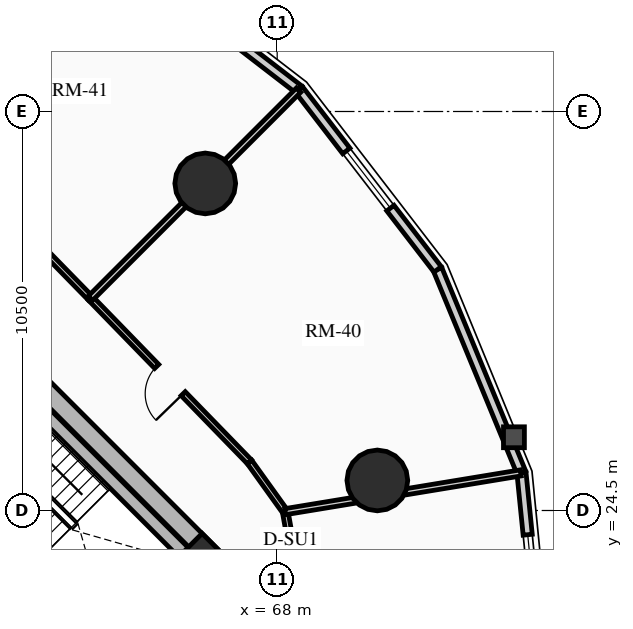
"""IFC4 building model, lengths in metres.
Left out: names, types, materials, properties, quantities, classifications, styles, units other than length and angle.
Written with IfcOpenShell. Run it as: python <this file> out.ifc"""

import sys

from ifc_helpers import new_model, si_unit, direction, frame, frame_2d, origin, origin_2d, place, context, subcontext, project, spatial, rectangle, circle, extrude, source, transform, mapped, element, fill, save


model = new_model("IFC4")
c1 = context("Model", 3, precision=1e-05, world=origin(), true_north=direction((0.0, 1.0)))
c2 = subcontext(c1, "Body", "Model", "MODEL_VIEW")
j1 = project(units=[si_unit("LENGTHUNIT", "METRE"), si_unit("PLANEANGLEUNIT", "RADIAN")], contexts=[c1])
p1 = place(None, origin())
s1 = spatial("IfcSite", under=j1, at=p1, CompositionType="ELEMENT")
p2 = place(p1, origin())
s2 = spatial("IfcBuilding", under=s1, at=p2, CompositionType="ELEMENT")
p3 = place(p2, frame((0.0, 0.0, 62.74)))
s3 = spatial("IfcBuildingStorey", under=s2, at=p3, CompositionType="ELEMENT", Elevation=62.74)
p4 = place(p3, frame((66.339, 23.227, 0.0), z_axis=(0.0, 0.0, 1.0), x_axis=(-0.707106781187, 0.707106781187, 0.0)))
e1 = element("IfcWall", 1, at=p4, inside=s3, PredefinedType="SHEAR", context=c2, shape_type="SweptSolid", body=[
    extrude(rectangle(XDim=14.3, YDim=0.5, at=frame_2d((7.15, 0.0))), origin(), (0.0, 0.0, 1.0), 2.91),
])
p5 = place(p3, frame((58.596, 15.838, 0.0), z_axis=(0.0, 0.0, 1.0), x_axis=(0.707106781187, 0.707106781187, 0.0)))
e2 = element("IfcWall", 2, at=p5, inside=s3, PredefinedType="SHEAR", context=c2, shape_type="SweptSolid", body=[
    extrude(rectangle(XDim=10.7, YDim=0.5, at=frame_2d((5.35, 0.0))), origin(), (0.0, 0.0, 1.0), 2.91),
])
m1 = source(origin(), c2, "Body", "SweptSolid", [
    extrude(rectangle(XDim=1.5, YDim=2.02, at=frame_2d((0.75, 1.01))), frame((0.0, 0.26, 0.0), z_axis=(0.0, -1.0, 0.0), x_axis=(1.0, 0.0, 0.0)), (0.0, 0.0, 1.0), 0.52),
])
p6 = place(p5, frame((5.45, 0.0, 0.0)))
e3 = element("IfcOpeningElement", 3, at=p6, cuts=e2, PredefinedType="OPENING", context=c2, shape_type="MappedRepresentation", body=[
    mapped(m1, transform((0.0, 0.0, 0.0), x_axis=(1.0, 0.0, 0.0), y_axis=(0.0, 1.0, 0.0), z_axis=(0.0, 0.0, 1.0), scale=1.0)),
])
p7 = place(p3, frame((63.662, 20.904, 0.0), z_axis=(0.0, 0.0, 1.0), x_axis=(-0.707106781187, 0.707106781187, 0.0)))
e4 = element("IfcWall", 4, at=p7, inside=s3, PredefinedType="SHEAR", context=c2, shape_type="SweptSolid", body=[
    extrude(rectangle(XDim=13.8, YDim=0.35, at=frame_2d((6.9, 0.0))), origin(), (0.0, 0.0, 1.0), 2.91),
])
m2 = source(origin(), c2, "Body", "SweptSolid", [
    extrude(rectangle(XDim=1.1, YDim=2.015, at=frame_2d((0.55, 1.007))), frame((0.0, 0.185, 0.0), z_axis=(0.0, -1.0, 0.0), x_axis=(1.0, 0.0, 0.0)), (0.0, 0.0, 1.0), 0.37),
])
p8 = place(p7, frame((10.025, 0.0, 0.0)))
e5 = element("IfcOpeningElement", 5, at=p8, cuts=e4, PredefinedType="OPENING", context=c2, shape_type="MappedRepresentation", body=[
    mapped(m2, transform((0.0, 0.0, 0.0), x_axis=(1.0, 0.0, 0.0), y_axis=(0.0, 1.0, 0.0), z_axis=(0.0, 0.0, 1.0), scale=1.0)),
])
p9 = place(p7, frame((12.025, 0.0, 0.0)))
e6 = element("IfcOpeningElement", 6, at=p9, cuts=e4, PredefinedType="OPENING", context=c2, shape_type="MappedRepresentation", body=[
    mapped(m2, transform((0.0, 0.0, 0.0), x_axis=(1.0, 0.0, 0.0), y_axis=(0.0, 1.0, 0.0), z_axis=(0.0, 0.0, 1.0), scale=1.0)),
])
m3 = source(origin(), c2, "Body", "SweptSolid", [
    extrude(rectangle(XDim=1.15, YDim=2.02, at=frame_2d((0.575, 1.01))), frame((0.0, 0.185, 0.0), z_axis=(0.0, -1.0, 0.0), x_axis=(1.0, 0.0, 0.0)), (0.0, 0.0, 1.0), 0.37),
])
p10 = place(p7, frame((5.33, 0.0, 0.0)))
e7 = element("IfcOpeningElement", 7, at=p10, cuts=e4, PredefinedType="OPENING", context=c2, shape_type="MappedRepresentation", body=[
    mapped(m3, transform((0.0, 0.0, 0.0), x_axis=(1.0, 0.0, 0.0), y_axis=(0.0, 1.0, 0.0), z_axis=(0.0, 0.0, 1.0), scale=1.0)),
])
p11 = place(p3, frame((65.847, 23.089, 0.0), z_axis=(0.0, 0.0, 1.0), x_axis=(-0.707106781187, 0.707106781187, 0.0)))
e8 = element("IfcWall", 8, at=p11, inside=s3, PredefinedType="SHEAR", context=c2, shape_type="SweptSolid", body=[
    extrude(rectangle(XDim=6.745, YDim=0.35, at=frame_2d((3.373, 0.0))), origin(), (0.0, 0.0, 1.0), 2.91),
])
p12 = place(p3, frame((66.024, 23.294, 0.0), z_axis=(0.0, 0.0, 1.0), x_axis=(0.707106781187, 0.707106781187, 0.0)))
e9 = element("IfcColumn", 9, at=p12, inside=s3, PredefinedType="COLUMN", context=c2, shape_type="SweptSolid", body=[
    extrude(rectangle(XDim=0.85, YDim=0.85, at=origin_2d()), origin(), (0.0, 0.0, 1.0), 2.91),
])
for number, where, z_axis, x_axis in (
    (10, (66.107, 33.107, 0.0), (0.0, 0.0, 1.0), (1.0, 0.0, 0.0)),
    (11, (70.635, 25.291, 0.0), (0.0, 0.0, 1.0), (1.0, 0.0, 0.0)),
):
    element("IfcColumn", number, at=place(p3, frame(where, z_axis=z_axis, x_axis=x_axis)), inside=s3, PredefinedType="USERDEFINED", context=c2, shape_type="SweptSolid", body=[
        extrude(circle(Radius=0.8, at=origin_2d()), origin(), (0.0, 0.0, 1.0), 2.91),
    ])
p13 = place(p3, frame((63.844, 39.222, 0.0), z_axis=(0.0, 0.0, 1.0), x_axis=(0.792014314407, -0.610502519057, 0.0)))
e12 = element("IfcWall", 12, at=p13, inside=s3, PredefinedType="SOLIDWALL", context=c2, shape_type="SweptSolid", body=[
    extrude(rectangle(XDim=5.973, YDim=0.24, at=frame_2d((2.987, 0.0))), origin(), (0.0, 0.0, 1.0), 2.079),
])
p14 = place(p3, frame((74.428, 25.493, 0.0), z_axis=(0.0, 0.0, 1.0), x_axis=(0.100165739718, -0.994970765694, 0.0)))
e13 = element("IfcWall", 13, at=p14, inside=s3, PredefinedType="SOLIDWALL", context=c2, shape_type="SweptSolid", body=[
    extrude(rectangle(XDim=5.477, YDim=0.24, at=frame_2d((2.738, 0.0))), origin(), (0.0, 0.0, 1.0), 2.079),
])
m4 = source(origin(), c2, "Body", "SweptSolid", [
    extrude(rectangle(XDim=2.2, YDim=1.35, at=frame_2d((1.1, 0.675))), frame((0.0, 0.13, 0.0), z_axis=(0.0, -1.0, 0.0), x_axis=(1.0, 0.0, 0.0)), (0.0, 0.0, 1.0), 0.26),
])
p15 = place(p14, frame((1.638, 0.0, 0.65)))
e14 = element("IfcOpeningElement", 14, at=p15, cuts=e13, PredefinedType="OPENING", context=c2, shape_type="MappedRepresentation", body=[
    mapped(m4, transform((0.0, 0.0, 0.0), x_axis=(1.0, 0.0, 0.0), y_axis=(0.0, 1.0, 0.0), z_axis=(0.0, 0.0, 1.0), scale=1.0)),
])
p16 = place(p3, frame((72.222, 30.844, 0.0), z_axis=(0.0, 0.0, 1.0), x_axis=(0.381027682565, -0.924563629567, 0.0)))
e15 = element("IfcWall", 15, at=p16, inside=s3, PredefinedType="SOLIDWALL", context=c2, shape_type="SweptSolid", body=[
    extrude(rectangle(XDim=5.789, YDim=0.24, at=frame_2d((2.894, 0.0))), origin(), (0.0, 0.0, 1.0), 2.079),
])
p17 = place(p3, frame((68.575, 35.575, 0.0), z_axis=(0.0, 0.0, 1.0), x_axis=(0.610502519057, -0.792014314407, 0.0)))
e16 = element("IfcWall", 16, at=p17, inside=s3, PredefinedType="SOLIDWALL", context=c2, shape_type="SweptSolid", body=[
    extrude(rectangle(XDim=5.973, YDim=0.24, at=frame_2d((2.987, 0.0))), origin(), (0.0, 0.0, 1.0), 2.079),
])
m5 = source(origin(), c2, "Body", "SweptSolid", [
    extrude(rectangle(XDim=1.9, YDim=1.35, at=frame_2d((0.95, 0.675))), frame((0.0, 0.13, 0.0), z_axis=(0.0, -1.0, 0.0), x_axis=(1.0, 0.0, 0.0)), (0.0, 0.0, 1.0), 0.26),
])
p18 = place(p17, frame((2.037, 0.0, 0.65)))
e17 = element("IfcOpeningElement", 17, at=p18, cuts=e16, PredefinedType="OPENING", context=c2, shape_type="MappedRepresentation", body=[
    mapped(m5, transform((0.0, 0.0, 0.0), x_axis=(1.0, 0.0, 0.0), y_axis=(0.0, 1.0, 0.0), z_axis=(0.0, 0.0, 1.0), scale=1.0)),
])
p19 = place(p3, frame((63.086, 30.086, 0.0), z_axis=(0.0, 0.0, 1.0), x_axis=(-0.699075897379, 0.715047473741, 0.0)))
e18 = element("IfcWall", 18, at=p19, inside=s3, PredefinedType="PARTITIONING", context=c2, shape_type="SweptSolid", body=[
    extrude(rectangle(XDim=6.114, YDim=0.15, at=frame_2d((3.057, 0.0))), origin(), (0.0, 0.0, 1.0), 2.079),
])
p20 = place(p3, frame((68.456, 23.11, 0.0), z_axis=(0.0, 0.0, 1.0), x_axis=(-0.1772522795, 0.984165448191, 0.0)))
e19 = element("IfcWall", 19, at=p20, inside=s3, PredefinedType="PARTITIONING", context=c2, shape_type="SweptSolid", body=[
    extrude(rectangle(XDim=1.382, YDim=0.15, at=frame_2d((0.691, 0.0))), origin(), (0.0, 0.0, 1.0), 2.079),
])
p21 = place(p3, frame((68.211, 24.469, 0.0), z_axis=(0.0, 0.0, 1.0), x_axis=(-0.583012141368, 0.812463441034, 0.0)))
e20 = element("IfcWall", 20, at=p21, inside=s3, PredefinedType="PARTITIONING", context=c2, shape_type="SweptSolid", body=[
    extrude(rectangle(XDim=1.613, YDim=0.15, at=frame_2d((0.807, 0.0))), origin(), (0.0, 0.0, 1.0), 2.125),
])
p22 = place(p3, frame((67.27, 25.78, 0.0), z_axis=(0.0, 0.0, 1.0), x_axis=(-0.696847842907, 0.717218992942, 0.0)))
e21 = element("IfcWall", 21, at=p22, inside=s3, PredefinedType="PARTITIONING", context=c2, shape_type="SweptSolid", body=[
    extrude(rectangle(XDim=6.004, YDim=0.15, at=frame_2d((3.002, 0.0))), origin(), (0.0, 0.0, 1.0), 2.555),
])
m6 = source(origin(), c2, "Body", "SweptSolid", [
    extrude(rectangle(XDim=1.0, YDim=2.015, at=frame_2d((0.5, 1.007))), frame((0.0, 0.085, 0.0), z_axis=(0.0, -1.0, 0.0), x_axis=(1.0, 0.0, 0.0)), (0.0, 0.0, 1.0), 0.17),
])
p23 = place(p22, frame((2.502, 0.0, 0.0)))
e22 = element("IfcOpeningElement", 22, at=p23, cuts=e21, PredefinedType="OPENING", context=c2, shape_type="MappedRepresentation", body=[
    mapped(m6, transform((0.0, 0.0, 0.0), x_axis=(1.0, 0.0, 0.0), y_axis=(0.0, 1.0, 0.0), z_axis=(0.0, 0.0, 1.0), scale=1.0)),
])
p24 = place(p3, frame((63.086, 30.086, 0.0), z_axis=(0.0, 0.0, 1.0), x_axis=(0.707106781187, 0.707106781187, 0.0)))
e23 = element("IfcWall", 23, at=p24, inside=s3, PredefinedType="PARTITIONING", context=c2, shape_type="SweptSolid", body=[
    extrude(rectangle(XDim=7.743, YDim=0.16, at=frame_2d((3.872, 0.0))), origin(), (0.0, 0.0, 1.0), 2.079),
])
p25 = place(p3, frame((68.211, 24.469, 0.0), z_axis=(0.0, 0.0, 1.0), x_axis=(0.986718695255, 0.162438346562, 0.0)))
e24 = element("IfcWall", 24, at=p25, inside=s3, PredefinedType="PARTITIONING", context=c2, shape_type="SweptSolid", body=[
    extrude(rectangle(XDim=6.281, YDim=0.16, at=frame_2d((3.141, 0.0))), origin(), (0.0, 0.0, 1.0), 2.079),
])
m7 = source(origin(), c2, "Body", "SweptSolid", [
    extrude(rectangle(XDim=2.2, YDim=1.35, at=frame_2d((1.1, 0.675))), frame((0.0, 0.03, 0.0), z_axis=(0.0, -1.0, 0.0), x_axis=(1.0, 0.0, 0.0)), (0.0, 0.0, 1.0), 0.06),
])
p26 = place(p15, origin())
e25 = element("IfcWindow", 25, at=p26, inside=s3, PartitioningType="DOUBLE_PANEL_VERTICAL", PredefinedType="WINDOW", context=c2, shape_type="MappedRepresentation", body=[
    mapped(m7, transform((0.0, 0.0, 0.0), x_axis=(1.0, 0.0, 0.0), y_axis=(0.0, 1.0, 0.0), z_axis=(0.0, 0.0, 1.0), scale=1.0)),
])
fill(e14, e25)
m8 = source(origin(), c2, "Body", "SweptSolid", [
    extrude(rectangle(XDim=1.9, YDim=1.35, at=frame_2d((0.95, 0.675))), frame((0.0, 0.03, 0.0), z_axis=(0.0, -1.0, 0.0), x_axis=(1.0, 0.0, 0.0)), (0.0, 0.0, 1.0), 0.06),
])
p27 = place(p18, origin())
e26 = element("IfcWindow", 26, at=p27, inside=s3, PartitioningType="DOUBLE_PANEL_VERTICAL", PredefinedType="WINDOW", context=c2, shape_type="MappedRepresentation", body=[
    mapped(m8, transform((0.0, 0.0, 0.0), x_axis=(1.0, 0.0, 0.0), y_axis=(0.0, 1.0, 0.0), z_axis=(0.0, 0.0, 1.0), scale=1.0)),
])
fill(e17, e26)
m9 = source(origin(), c2, "Body", "SweptSolid", [
    extrude(rectangle(XDim=1.0, YDim=2.015, at=frame_2d((0.5, 1.007))), frame((0.0, 0.025, 0.0), z_axis=(0.0, -1.0, 0.0), x_axis=(1.0, 0.0, 0.0)), (0.0, 0.0, 1.0), 0.05),
])
p28 = place(p23, origin())
e27 = element("IfcDoor", 27, at=p28, inside=s3, OperationType="SINGLE_SWING_LEFT", PredefinedType="DOOR", context=c2, shape_type="MappedRepresentation", body=[
    mapped(m9, transform((0.0, 0.0, 0.0), x_axis=(1.0, 0.0, 0.0), y_axis=(0.0, 1.0, 0.0), z_axis=(0.0, 0.0, 1.0), scale=1.0)),
])
fill(e22, e27)
save(model, sys.argv[1])
